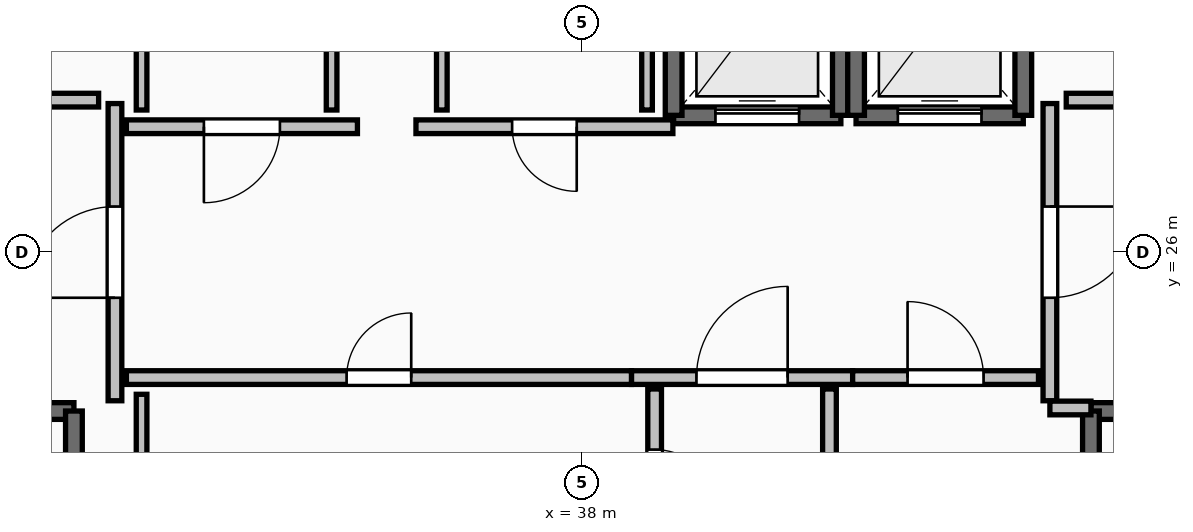
"""IFC4 building model, lengths in metres.
Left out: names, types, materials, properties, quantities, classifications, styles, units other than length and angle.
Written with IfcOpenShell. Run it as: python <this file> out.ifc"""

import sys

from ifc_helpers import new_model, si_unit, direction, frame, frame_2d, origin, place, context, subcontext, project, spatial, rectangle, extrude, element, fill, save


model = new_model("IFC4")
c1 = context("Model", 3, precision=1e-05, world=origin(), true_north=direction((0.0, 1.0)))
c2 = subcontext(c1, "Body", "Model", "MODEL_VIEW")
j1 = project(units=[si_unit("LENGTHUNIT", "METRE"), si_unit("PLANEANGLEUNIT", "RADIAN")], contexts=[c1])
p1 = place(None, origin())
s1 = spatial("IfcSite", under=j1, at=p1, CompositionType="ELEMENT")
p2 = place(p1, origin())
s2 = spatial("IfcBuilding", under=s1, at=p2, CompositionType="ELEMENT")
p3 = place(p2, frame((0.0, 0.0, 244.9)))
s3 = spatial("IfcBuildingStorey", under=s2, at=p3, CompositionType="ELEMENT", Elevation=244.9)
p4 = place(p3, frame((27.94, 23.91, 0.0), z_axis=(0.0, 0.0, 1.0), x_axis=(1.0, 0.0, 0.0)))
e1 = element("IfcWall", 1, at=p4, inside=s3, PredefinedType="SOLIDWALL", context=c2, shape_type="SweptSolid", body=[
    extrude(rectangle(XDim=3.37, YDim=0.22, at=frame_2d((1.685, 0.0))), origin(), (0.0, 0.0, 1.0), 3.29),
])
p5 = place(p4, frame((1.135, 0.0, 0.0)))
e2 = element("IfcOpeningElement", 2, at=p5, cuts=e1, PredefinedType="OPENING", context=c2, shape_type="SweptSolid", body=[
    extrude(rectangle(XDim=1.1, YDim=2.15, at=frame_2d((0.55, 1.075))), frame((0.0, 0.125, 0.0), z_axis=(0.0, -1.0, 0.0), x_axis=(1.0, 0.0, 0.0)), (0.0, 0.0, 1.0), 0.25),
])
p6 = place(p3, frame((31.31, 23.91, 0.0), z_axis=(0.0, 0.0, 1.0), x_axis=(0.0, -1.0, 0.0)))
e3 = element("IfcWall", 3, at=p6, inside=s3, PredefinedType="SOLIDWALL", context=c2, shape_type="SweptSolid", body=[
    extrude(rectangle(XDim=7.42, YDim=0.22, at=frame_2d((3.71, 0.0))), origin(), (0.0, 0.0, 1.0), 3.29),
])
p7 = place(p3, frame((44.69, 23.91, 0.0), z_axis=(0.0, 0.0, 1.0), x_axis=(1.0, 0.0, 0.0)))
e4 = element("IfcWall", 4, at=p7, inside=s3, PredefinedType="SOLIDWALL", context=c2, shape_type="SweptSolid", body=[
    extrude(rectangle(XDim=3.37, YDim=0.22, at=frame_2d((1.685, 0.0))), origin(), (0.0, 0.0, 1.0), 3.29),
])
p8 = place(p7, frame((1.135, 0.0, 0.0)))
e5 = element("IfcOpeningElement", 5, at=p8, cuts=e4, PredefinedType="OPENING", context=c2, shape_type="SweptSolid", body=[
    extrude(rectangle(XDim=1.1, YDim=2.15, at=frame_2d((0.55, 1.075))), frame((0.0, 0.125, 0.0), z_axis=(0.0, -1.0, 0.0), x_axis=(1.0, 0.0, 0.0)), (0.0, 0.0, 1.0), 0.25),
])
p9 = place(p3, frame((44.69, 16.49, 0.0), z_axis=(0.0, 0.0, 1.0), x_axis=(0.0, 1.0, 0.0)))
e6 = element("IfcWall", 6, at=p9, inside=s3, PredefinedType="SOLIDWALL", context=c2, shape_type="SweptSolid", body=[
    extrude(rectangle(XDim=7.42, YDim=0.22, at=frame_2d((3.71, 0.0))), origin(), (0.0, 0.0, 1.0), 3.29),
])
p10 = place(p3, frame((39.2, 27.8, 0.0), z_axis=(0.0, 0.0, 1.0), x_axis=(1.0, 0.0, 0.0)))
e7 = element("IfcWall", 7, at=p10, inside=s3, PredefinedType="SOLIDWALL", context=c2, shape_type="SweptSolid", body=[
    extrude(rectangle(XDim=2.2, YDim=0.22, at=frame_2d((1.1, 0.0))), origin(), (0.0, 0.0, 1.0), 3.29),
])
p11 = place(p10, frame((0.55, 0.0, 0.0)))
e8 = element("IfcOpeningElement", 8, at=p11, cuts=e7, PredefinedType="OPENING", context=c2, shape_type="SweptSolid", body=[
    extrude(rectangle(XDim=1.1, YDim=2.2, at=frame_2d((0.55, 1.1))), frame((0.0, 0.125, 0.0), z_axis=(0.0, -1.0, 0.0), x_axis=(1.0, 0.0, 0.0)), (0.0, 0.0, 1.0), 0.25),
])
for number, where, z_axis, x_axis in (
    (9, (41.4, 27.8, 0.0), (0.0, 0.0, 1.0), (0.0, 1.0, 0.0)),
    (10, (39.2, 30.4, 0.0), (0.0, 0.0, 1.0), (0.0, -1.0, 0.0)),
):
    element("IfcWall", number, at=place(p3, frame(where, z_axis=z_axis, x_axis=x_axis)), inside=s3, PredefinedType="SOLIDWALL", context=c2, shape_type="SweptSolid", body=[
        extrude(rectangle(XDim=2.6, YDim=0.22, at=frame_2d((1.3, 0.0))), origin(), (0.0, 0.0, 1.0), 3.29),
    ])
p12 = place(p3, frame((41.6, 27.8, 0.0), z_axis=(0.0, 0.0, 1.0), x_axis=(1.0, 0.0, 0.0)))
e11 = element("IfcWall", 11, at=p12, inside=s3, PredefinedType="SOLIDWALL", context=c2, shape_type="SweptSolid", body=[
    extrude(rectangle(XDim=2.2, YDim=0.22, at=frame_2d((1.1, 0.0))), origin(), (0.0, 0.0, 1.0), 3.29),
])
p13 = place(p12, frame((0.55, 0.0, 0.0)))
e12 = element("IfcOpeningElement", 12, at=p13, cuts=e11, PredefinedType="OPENING", context=c2, shape_type="SweptSolid", body=[
    extrude(rectangle(XDim=1.1, YDim=2.2, at=frame_2d((0.55, 1.1))), frame((0.0, 0.125, 0.0), z_axis=(0.0, -1.0, 0.0), x_axis=(1.0, 0.0, 0.0)), (0.0, 0.0, 1.0), 0.25),
])
for number, where, z_axis, x_axis in (
    (13, (43.8, 27.8, 0.0), (0.0, 0.0, 1.0), (0.0, 1.0, 0.0)),
    (14, (41.6, 30.4, 0.0), (0.0, 0.0, 1.0), (0.0, -1.0, 0.0)),
):
    element("IfcWall", number, at=place(p3, frame(where, z_axis=z_axis, x_axis=x_axis)), inside=s3, PredefinedType="SOLIDWALL", context=c2, shape_type="SweptSolid", body=[
        extrude(rectangle(XDim=2.6, YDim=0.22, at=frame_2d((1.3, 0.0))), origin(), (0.0, 0.0, 1.0), 3.29),
    ])
p14 = place(p3, frame((31.85, 24.045, 0.0), z_axis=(0.0, 0.0, 1.0), x_axis=(0.0, 1.0, 0.0)))
e15 = element("IfcWall", 15, at=p14, inside=s3, PredefinedType="PARTITIONING", context=c2, shape_type="SweptSolid", body=[
    extrude(rectangle(XDim=3.91, YDim=0.18, at=frame_2d((1.955, 0.0))), origin(), (0.0, 0.0, 1.0), 3.29),
])
p15 = place(p14, frame((1.355, 0.0, 0.0)))
e16 = element("IfcOpeningElement", 16, at=p15, cuts=e15, PredefinedType="OPENING", context=c2, shape_type="SweptSolid", body=[
    extrude(rectangle(XDim=1.2, YDim=2.15, at=frame_2d((0.6, 1.075))), frame((0.0, 0.105, 0.0), z_axis=(0.0, -1.0, 0.0), x_axis=(1.0, 0.0, 0.0)), (0.0, 0.0, 1.0), 0.21),
])
p16 = place(p3, frame((44.15, 27.955, 0.0), z_axis=(0.0, 0.0, 1.0), x_axis=(0.0, -1.0, 0.0)))
e17 = element("IfcWall", 17, at=p16, inside=s3, PredefinedType="PARTITIONING", context=c2, shape_type="SweptSolid", body=[
    extrude(rectangle(XDim=3.91, YDim=0.18, at=frame_2d((1.955, 0.0))), origin(), (0.0, 0.0, 1.0), 3.29),
])
p17 = place(p16, frame((1.355, 0.0, 0.0)))
e18 = element("IfcOpeningElement", 18, at=p17, cuts=e17, PredefinedType="OPENING", context=c2, shape_type="SweptSolid", body=[
    extrude(rectangle(XDim=1.2, YDim=2.15, at=frame_2d((0.6, 1.075))), frame((0.0, 0.105, 0.0), z_axis=(0.0, -1.0, 0.0), x_axis=(1.0, 0.0, 0.0)), (0.0, 0.0, 1.0), 0.21),
])
p18 = place(p3, frame((44.15, 23.95, 0.0), z_axis=(0.0, 0.0, 1.0), x_axis=(1.0, 0.0, 0.0)))
e19 = element("IfcWall", 19, at=p18, inside=s3, PredefinedType="PARTITIONING", context=c2, shape_type="SweptSolid", body=[
    extrude(rectangle(XDim=0.54, YDim=0.18, at=frame_2d((0.27, 0.0))), origin(), (0.0, 0.0, 1.0), 3.29),
])
p19 = place(p3, frame((38.645, 24.35, 0.0), z_axis=(0.0, 0.0, 1.0), x_axis=(1.0, 0.0, 0.0)))
e20 = element("IfcWall", 20, at=p19, inside=s3, PredefinedType="PARTITIONING", context=c2, shape_type="SweptSolid", body=[
    extrude(rectangle(XDim=2.91, YDim=0.18, at=frame_2d((1.455, 0.0))), origin(), (0.0, 0.0, 1.0), 3.29),
])
p20 = place(p19, frame((0.855, 0.0, 0.0)))
e21 = element("IfcOpeningElement", 21, at=p20, cuts=e20, PredefinedType="OPENING", context=c2, shape_type="SweptSolid", body=[
    extrude(rectangle(XDim=1.2, YDim=2.15, at=frame_2d((0.6, 1.075))), frame((0.0, 0.105, 0.0), z_axis=(0.0, -1.0, 0.0), x_axis=(1.0, 0.0, 0.0)), (0.0, 0.0, 1.0), 0.21),
])
p21 = place(p3, frame((41.555, 24.35, 0.0), z_axis=(0.0, 0.0, 1.0), x_axis=(1.0, 0.0, 0.0)))
e22 = element("IfcWall", 22, at=p21, inside=s3, PredefinedType="PARTITIONING", context=c2, shape_type="SweptSolid", body=[
    extrude(rectangle(XDim=2.445, YDim=0.18, at=frame_2d((1.223, 0.0))), origin(), (0.0, 0.0, 1.0), 3.29),
])
p22 = place(p21, frame((0.722, 0.0, 0.0)))
e23 = element("IfcOpeningElement", 23, at=p22, cuts=e22, PredefinedType="OPENING", context=c2, shape_type="SweptSolid", body=[
    extrude(rectangle(XDim=1.0, YDim=2.15, at=frame_2d((0.5, 1.075))), frame((0.0, 0.105, 0.0), z_axis=(0.0, -1.0, 0.0), x_axis=(1.0, 0.0, 0.0)), (0.0, 0.0, 1.0), 0.21),
])
p23 = place(p3, frame((35.04, 27.65, 0.0), z_axis=(0.0, 0.0, 1.0), x_axis=(-1.0, 0.0, 0.0)))
e24 = element("IfcWall", 24, at=p23, inside=s3, PredefinedType="PARTITIONING", context=c2, shape_type="SweptSolid", body=[
    extrude(rectangle(XDim=3.04, YDim=0.18, at=frame_2d((1.52, 0.0))), origin(), (0.0, 0.0, 1.0), 3.29),
])
p24 = place(p23, frame((1.02, 0.0, 0.0)))
e25 = element("IfcOpeningElement", 25, at=p24, cuts=e24, PredefinedType="OPENING", context=c2, shape_type="SweptSolid", body=[
    extrude(rectangle(XDim=1.0, YDim=2.15, at=frame_2d((0.5, 1.075))), frame((0.0, 0.105, 0.0), z_axis=(0.0, -1.0, 0.0), x_axis=(1.0, 0.0, 0.0)), (0.0, 0.0, 1.0), 0.21),
])
p25 = place(p3, frame((39.19, 27.65, 0.0), z_axis=(0.0, 0.0, 1.0), x_axis=(-1.0, 0.0, 0.0)))
e26 = element("IfcWall", 26, at=p25, inside=s3, PredefinedType="PARTITIONING", context=c2, shape_type="SweptSolid", body=[
    extrude(rectangle(XDim=3.38, YDim=0.18, at=frame_2d((1.69, 0.0))), origin(), (0.0, 0.0, 1.0), 3.29),
])
p26 = place(p25, frame((1.265, 0.0, 0.0)))
e27 = element("IfcOpeningElement", 27, at=p26, cuts=e26, PredefinedType="OPENING", context=c2, shape_type="SweptSolid", body=[
    extrude(rectangle(XDim=0.85, YDim=2.1, at=frame_2d((0.425, 1.05))), frame((0.0, 0.105, 0.0), z_axis=(0.0, -1.0, 0.0), x_axis=(1.0, 0.0, 0.0)), (0.0, 0.0, 1.0), 0.21),
])
p27 = place(p3, frame((32.0, 24.35, 0.0), z_axis=(0.0, 0.0, 1.0), x_axis=(1.0, 0.0, 0.0)))
e28 = element("IfcWall", 28, at=p27, inside=s3, PredefinedType="PARTITIONING", context=c2, shape_type="SweptSolid", body=[
    extrude(rectangle(XDim=6.645, YDim=0.18, at=frame_2d((3.323, 0.0))), origin(), (0.0, 0.0, 1.0), 3.29),
])
p28 = place(p27, frame((2.897, 0.0, 0.0)))
e29 = element("IfcOpeningElement", 29, at=p28, cuts=e28, PredefinedType="OPENING", context=c2, shape_type="SweptSolid", body=[
    extrude(rectangle(XDim=0.85, YDim=2.1, at=frame_2d((0.425, 1.05))), frame((0.0, 0.105, 0.0), z_axis=(0.0, -1.0, 0.0), x_axis=(1.0, 0.0, 0.0)), (0.0, 0.0, 1.0), 0.21),
])
p29 = place(p3, frame((41.25, 20.305, 0.0), z_axis=(0.0, 0.0, 1.0), x_axis=(0.0, 1.0, 0.0)))
e30 = element("IfcWall", 30, at=p29, inside=s3, PredefinedType="PARTITIONING", context=c2, shape_type="SweptSolid", body=[
    extrude(rectangle(XDim=3.895, YDim=0.18, at=frame_2d((1.948, 0.0))), origin(), (0.0, 0.0, 1.0), 2.482),
])
p30 = place(p29, frame((1.448, 0.0, 0.0)))
e31 = element("IfcOpeningElement", 31, at=p30, cuts=e30, PredefinedType="OPENING", context=c2, shape_type="SweptSolid", body=[
    extrude(rectangle(XDim=1.0, YDim=2.15, at=frame_2d((0.5, 1.075))), frame((0.0, 0.105, 0.0), z_axis=(0.0, -1.0, 0.0), x_axis=(1.0, 0.0, 0.0)), (0.0, 0.0, 1.0), 0.21),
])
p31 = place(p3, frame((38.95, 24.2, 0.0), z_axis=(0.0, 0.0, 1.0), x_axis=(0.0, -1.0, 0.0)))
e32 = element("IfcWall", 32, at=p31, inside=s3, PredefinedType="PARTITIONING", context=c2, shape_type="SweptSolid", body=[
    extrude(rectangle(XDim=2.445, YDim=0.18, at=frame_2d((1.223, 0.0))), origin(), (0.0, 0.0, 1.0), 2.482),
])
p32 = place(p31, frame((0.798, 0.0, 0.0)))
e33 = element("IfcOpeningElement", 33, at=p32, cuts=e32, PredefinedType="OPENING", context=c2, shape_type="SweptSolid", body=[
    extrude(rectangle(XDim=0.85, YDim=2.1, at=frame_2d((0.425, 1.05))), frame((0.0, 0.105, 0.0), z_axis=(0.0, -1.0, 0.0), x_axis=(1.0, 0.0, 0.0)), (0.0, 0.0, 1.0), 0.21),
])
for number, where, z_axis, x_axis in (
    (34, (31.635, 28.0, 0.0), (0.0, 0.0, 1.0), (-1.0, 0.0, 0.0)),
    (35, (45.28, 28.0, 0.0), (0.0, 0.0, 1.0), (-1.0, 0.0, 0.0)),
):
    element("IfcWall", number, at=place(p3, frame(where, z_axis=z_axis, x_axis=x_axis)), inside=s3, PredefinedType="PARTITIONING", context=c2, shape_type="SweptSolid", body=[
        extrude(rectangle(XDim=0.915, YDim=0.18, at=frame_2d((0.458, 0.0))), origin(), (0.0, 0.0, 1.0), 3.29),
    ])
for number, where, z_axis, x_axis in (
    (36, (32.2, 30.26, 0.0), (0.0, 0.0, 1.0), (0.0, -1.0, 0.0)),
    (37, (34.7, 27.87, 0.0), (0.0, 0.0, 1.0), (0.0, 1.0, 0.0)),
    (38, (36.15, 30.26, 0.0), (0.0, 0.0, 1.0), (0.0, -1.0, 0.0)),
    (39, (38.85, 27.87, 0.0), (0.0, 0.0, 1.0), (0.0, 1.0, 0.0)),
):
    element("IfcWall", number, at=place(p3, frame(where, z_axis=z_axis, x_axis=x_axis)), inside=s3, PredefinedType="PARTITIONING", context=c2, shape_type="SweptSolid", body=[
        extrude(rectangle(XDim=2.39, YDim=0.14, at=frame_2d((1.195, 0.0))), origin(), (0.0, 0.0, 1.0), 3.29),
    ])
p33 = place(p3, frame((32.2, 24.13, 0.0), z_axis=(0.0, 0.0, 1.0), x_axis=(0.0, -1.0, 0.0)))
e40 = element("IfcWall", 40, at=p33, inside=s3, PredefinedType="PARTITIONING", context=c2, shape_type="SweptSolid", body=[
    extrude(rectangle(XDim=2.46, YDim=0.14, at=frame_2d((1.23, 0.0))), origin(), (0.0, 0.0, 1.0), 2.482),
])
p34 = place(p11, origin())
e41 = element("IfcDoor", 41, at=p34, inside=s3, OperationType="SLIDING_TO_LEFT", PredefinedType="DOOR", context=c2, shape_type="SweptSolid", body=[
    extrude(rectangle(XDim=1.1, YDim=2.2, at=frame_2d((0.55, 1.1))), frame((0.0, 0.025, 0.0), z_axis=(0.0, -1.0, 0.0), x_axis=(1.0, 0.0, 0.0)), (0.0, 0.0, 1.0), 0.05),
])
fill(e8, e41)
p35 = place(p13, origin())
e42 = element("IfcDoor", 42, at=p35, inside=s3, OperationType="SLIDING_TO_LEFT", PredefinedType="DOOR", context=c2, shape_type="SweptSolid", body=[
    extrude(rectangle(XDim=1.1, YDim=2.2, at=frame_2d((0.55, 1.1))), frame((0.0, 0.025, 0.0), z_axis=(0.0, -1.0, 0.0), x_axis=(1.0, 0.0, 0.0)), (0.0, 0.0, 1.0), 0.05),
])
fill(e12, e42)
p36 = place(p15, origin())
e43 = element("IfcDoor", 43, at=p36, inside=s3, OperationType="SINGLE_SWING_LEFT", PredefinedType="DOOR", context=c2, shape_type="SweptSolid", body=[
    extrude(rectangle(XDim=1.2, YDim=2.15, at=frame_2d((0.6, 1.075))), frame((0.0, 0.025, 0.0), z_axis=(0.0, -1.0, 0.0), x_axis=(1.0, 0.0, 0.0)), (0.0, 0.0, 1.0), 0.05),
])
fill(e16, e43)
p37 = place(p17, origin())
e44 = element("IfcDoor", 44, at=p37, inside=s3, OperationType="SINGLE_SWING_LEFT", PredefinedType="DOOR", context=c2, shape_type="SweptSolid", body=[
    extrude(rectangle(XDim=1.2, YDim=2.15, at=frame_2d((0.6, 1.075))), frame((0.0, 0.025, 0.0), z_axis=(0.0, -1.0, 0.0), x_axis=(1.0, 0.0, 0.0)), (0.0, 0.0, 1.0), 0.05),
])
fill(e18, e44)
p38 = place(p20, origin())
e45 = element("IfcDoor", 45, at=p38, inside=s3, OperationType="SINGLE_SWING_RIGHT", PredefinedType="DOOR", context=c2, shape_type="SweptSolid", body=[
    extrude(rectangle(XDim=1.2, YDim=2.15, at=frame_2d((0.6, 1.075))), frame((0.0, 0.025, 0.0), z_axis=(0.0, -1.0, 0.0), x_axis=(1.0, 0.0, 0.0)), (0.0, 0.0, 1.0), 0.05),
])
fill(e21, e45)
p39 = place(p22, origin())
e46 = element("IfcDoor", 46, at=p39, inside=s3, OperationType="SINGLE_SWING_LEFT", PredefinedType="DOOR", context=c2, shape_type="SweptSolid", body=[
    extrude(rectangle(XDim=1.0, YDim=2.15, at=frame_2d((0.5, 1.075))), frame((0.0, 0.025, 0.0), z_axis=(0.0, -1.0, 0.0), x_axis=(1.0, 0.0, 0.0)), (0.0, 0.0, 1.0), 0.05),
])
fill(e23, e46)
p40 = place(p24, origin())
e47 = element("IfcDoor", 47, at=p40, inside=s3, OperationType="SINGLE_SWING_RIGHT", PredefinedType="DOOR", context=c2, shape_type="SweptSolid", body=[
    extrude(rectangle(XDim=1.0, YDim=2.15, at=frame_2d((0.5, 1.075))), frame((0.0, 0.025, 0.0), z_axis=(0.0, -1.0, 0.0), x_axis=(1.0, 0.0, 0.0)), (0.0, 0.0, 1.0), 0.05),
])
fill(e25, e47)
p41 = place(p26, origin())
e48 = element("IfcDoor", 48, at=p41, inside=s3, OperationType="SINGLE_SWING_LEFT", PredefinedType="DOOR", context=c2, shape_type="SweptSolid", body=[
    extrude(rectangle(XDim=0.85, YDim=2.1, at=frame_2d((0.425, 1.05))), frame((0.0, 0.025, 0.0), z_axis=(0.0, -1.0, 0.0), x_axis=(1.0, 0.0, 0.0)), (0.0, 0.0, 1.0), 0.05),
])
fill(e27, e48)
p42 = place(p28, origin())
e49 = element("IfcDoor", 49, at=p42, inside=s3, OperationType="SINGLE_SWING_RIGHT", PredefinedType="DOOR", context=c2, shape_type="SweptSolid", body=[
    extrude(rectangle(XDim=0.85, YDim=2.1, at=frame_2d((0.425, 1.05))), frame((0.0, 0.025, 0.0), z_axis=(0.0, -1.0, 0.0), x_axis=(1.0, 0.0, 0.0)), (0.0, 0.0, 1.0), 0.05),
])
fill(e29, e49)
p43 = place(p32, origin())
e50 = element("IfcDoor", 50, at=p43, inside=s3, OperationType="SINGLE_SWING_RIGHT", PredefinedType="DOOR", context=c2, shape_type="SweptSolid", body=[
    extrude(rectangle(XDim=0.85, YDim=2.1, at=frame_2d((0.425, 1.05))), frame((0.0, 0.025, 0.0), z_axis=(0.0, -1.0, 0.0), x_axis=(1.0, 0.0, 0.0)), (0.0, 0.0, 1.0), 0.05),
])
fill(e33, e50)
save(model, sys.argv[1])
